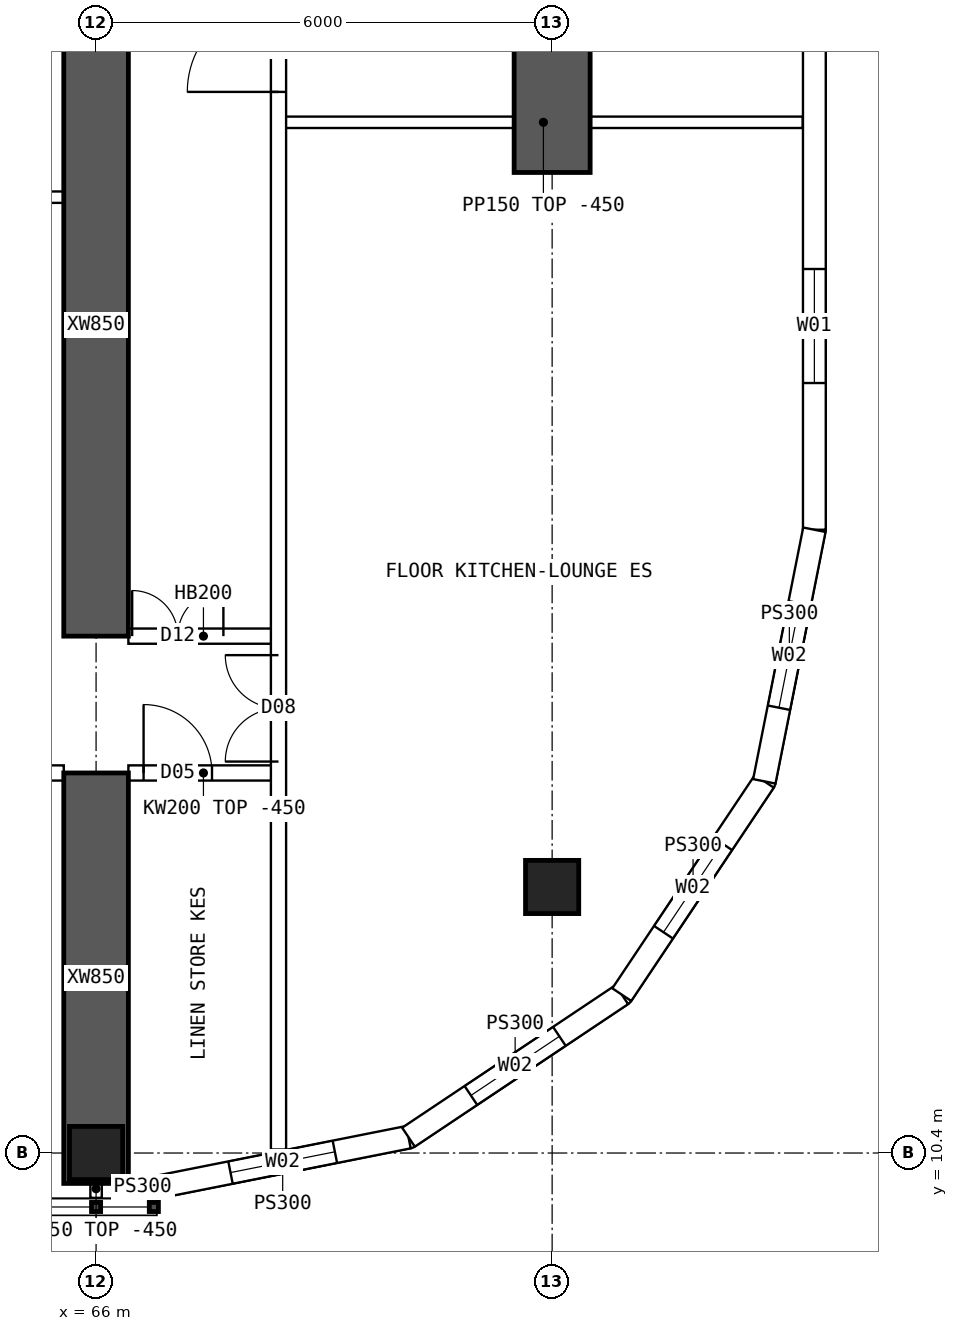
"""IFC4 building model, lengths in metres.
Left out: names, types, materials, properties, quantities, classifications, styles, units other than length and angle.
Written with IfcOpenShell. Run it as: python <this file> out.ifc"""

import sys

from ifc_helpers import new_model, si_unit, direction, frame, frame_2d, origin, origin_2d, place, context, subcontext, project, spatial, polyline, rectangle, hollow_rectangle, outline, extrude, element, fill, save


model = new_model("IFC4")
c1 = context("Model", 3, precision=1e-05, world=origin(), true_north=direction((0.0, 1.0)))
c2 = subcontext(c1, "Body", "Model", "MODEL_VIEW")
j1 = project(units=[si_unit("LENGTHUNIT", "METRE"), si_unit("PLANEANGLEUNIT", "RADIAN")], contexts=[c1])
p1 = place(None, origin())
s1 = spatial("IfcSite", under=j1, at=p1, CompositionType="ELEMENT")
p2 = place(p1, origin())
s2 = spatial("IfcBuilding", under=s1, at=p2, CompositionType="ELEMENT")
p3 = place(p2, frame((0.0, 0.0, 159.85)))
s3 = spatial("IfcBuildingStorey", under=s2, at=p3, CompositionType="ELEMENT", Elevation=159.85)
for number, where, z_axis, x_axis in (
    (1, (66.0, 10.4, 0.0), (0.0, 0.0, 1.0), (1.0, 0.0, 0.0)),
    (2, (72.0, 13.9, 0.0), (0.0, 0.0, 1.0), (1.0, 0.0, 0.0)),
):
    element("IfcColumn", number, at=place(p3, frame(where, z_axis=z_axis, x_axis=x_axis)), inside=s3, PredefinedType="COLUMN", context=c2, shape_type="SweptSolid", body=[
        extrude(hollow_rectangle(XDim=0.7, YDim=0.7, WallThickness=0.07, at=origin_2d()), origin(), (0.0, 0.0, 1.0), 3.75),
    ])
p4 = place(p3, frame((72.0, 23.3, 0.0), z_axis=(0.0, 0.0, 1.0), x_axis=(0.0, 1.0, 0.0)))
e3 = element("IfcWall", 3, at=p4, inside=s3, PredefinedType="SHEAR", context=c2, shape_type="SweptSolid", body=[
    extrude(rectangle(XDim=5.0, YDim=1.0, at=frame_2d((2.5, 0.0))), origin(), (0.0, 0.0, 1.0), 3.75),
])
p5 = place(p3, frame((66.0, 10.0, 0.0), z_axis=(0.0, 0.0, 1.0), x_axis=(0.0, 1.0, 0.0)))
e4 = element("IfcWall", 4, at=p5, inside=s3, PredefinedType="SHEAR", context=c2, shape_type="SweptSolid", body=[
    extrude(rectangle(XDim=5.4, YDim=0.85, at=frame_2d((2.7, 0.0))), origin(), (0.0, 0.0, 1.0), 3.75),
])
p6 = place(p3, frame((66.0, 17.2, 0.0), z_axis=(0.0, 0.0, 1.0), x_axis=(0.0, 1.0, 0.0)))
e5 = element("IfcWall", 5, at=p6, inside=s3, PredefinedType="SHEAR", context=c2, shape_type="SweptSolid", body=[
    extrude(rectangle(XDim=8.175, YDim=0.85, at=frame_2d((4.087, 0.0))), origin(), (0.0, 0.0, 1.0), 3.75),
])
p7 = place(p3, frame((75.45, 18.6, 0.0), z_axis=(0.0, 0.0, 1.0), x_axis=(0.0, 1.0, 0.0)))
e6 = element("IfcWall", 6, at=p7, inside=s3, PredefinedType="SOLIDWALL", context=c2, shape_type="SweptSolid", body=[
    extrude(outline(polyline([(-0.015, -0.15), (26.815, -0.15), (26.785, 0.15), (0.015, 0.15), (-0.015, -0.15)])), origin(), (0.0, 0.0, 1.0), 3.3),
])
p8 = place(p7, frame((1.93, 0.0, 0.9)))
e7 = element("IfcOpeningElement", 7, at=p8, cuts=e6, PredefinedType="OPENING", context=c2, shape_type="SweptSolid", body=[
    extrude(rectangle(XDim=1.5, YDim=2.0, at=frame_2d((0.75, 1.0))), frame((0.0, 0.16, 0.0), z_axis=(0.0, -1.0, 0.0), x_axis=(1.0, 0.0, 0.0)), (0.0, 0.0, 1.0), 0.32),
])
p9 = place(p7, frame((7.29, 0.0, 0.9)))
e8 = element("IfcOpeningElement", 8, at=p9, cuts=e6, PredefinedType="OPENING", context=c2, shape_type="SweptSolid", body=[
    extrude(rectangle(XDim=1.5, YDim=2.0, at=frame_2d((0.75, 1.0))), frame((0.0, 0.16, 0.0), z_axis=(0.0, -1.0, 0.0), x_axis=(1.0, 0.0, 0.0)), (0.0, 0.0, 1.0), 0.32),
])
p10 = place(p7, frame((12.65, 0.0, 0.9)))
e9 = element("IfcOpeningElement", 9, at=p10, cuts=e6, PredefinedType="OPENING", context=c2, shape_type="SweptSolid", body=[
    extrude(rectangle(XDim=1.5, YDim=2.0, at=frame_2d((0.75, 1.0))), frame((0.0, 0.16, 0.0), z_axis=(0.0, -1.0, 0.0), x_axis=(1.0, 0.0, 0.0)), (0.0, 0.0, 1.0), 0.32),
])
p11 = place(p7, frame((18.01, 0.0, 0.9)))
e10 = element("IfcOpeningElement", 10, at=p11, cuts=e6, PredefinedType="OPENING", context=c2, shape_type="SweptSolid", body=[
    extrude(rectangle(XDim=1.5, YDim=2.0, at=frame_2d((0.75, 1.0))), frame((0.0, 0.16, 0.0), z_axis=(0.0, -1.0, 0.0), x_axis=(1.0, 0.0, 0.0)), (0.0, 0.0, 1.0), 0.32),
])
p12 = place(p7, frame((23.37, 0.0, 0.9)))
e11 = element("IfcOpeningElement", 11, at=p12, cuts=e6, PredefinedType="OPENING", context=c2, shape_type="SweptSolid", body=[
    extrude(rectangle(XDim=1.5, YDim=2.0, at=frame_2d((0.75, 1.0))), frame((0.0, 0.16, 0.0), z_axis=(0.0, -1.0, 0.0), x_axis=(1.0, 0.0, 0.0)), (0.0, 0.0, 1.0), 0.32),
])
p13 = place(p3, frame((66.8, 9.95, 0.0), z_axis=(0.0, 0.0, 1.0), x_axis=(0.98078325777, 0.195100490205, 0.0)))
e12 = element("IfcWall", 12, at=p13, inside=s3, PredefinedType="SOLIDWALL", context=c2, shape_type="SweptSolid", body=[
    extrude(outline(polyline([(-0.03, -0.15), (3.405, -0.15), (3.345, 0.15), (0.03, 0.15), (-0.03, -0.15)])), origin(), (0.0, 0.0, 1.0), 3.3),
])
p14 = place(p13, frame((0.988, 0.0, 0.9)))
e13 = element("IfcOpeningElement", 13, at=p14, cuts=e12, PredefinedType="OPENING", context=c2, shape_type="SweptSolid", body=[
    extrude(rectangle(XDim=1.4, YDim=1.8, at=frame_2d((0.7, 0.9))), frame((0.0, 0.16, 0.0), z_axis=(0.0, -1.0, 0.0), x_axis=(1.0, 0.0, 0.0)), (0.0, 0.0, 1.0), 0.32),
])
p15 = place(p3, frame((70.11, 10.608, 0.0), z_axis=(0.0, 0.0, 1.0), x_axis=(0.831493450887, 0.555534554399, 0.0)))
e14 = element("IfcWall", 14, at=p15, inside=s3, PredefinedType="SOLIDWALL", context=c2, shape_type="SweptSolid", body=[
    extrude(outline(polyline([(-0.03, -0.15), (3.405, -0.15), (3.345, 0.15), (0.03, 0.15), (-0.03, -0.15)])), origin(), (0.0, 0.0, 1.0), 3.3),
])
p16 = place(p15, frame((0.988, 0.0, 0.9)))
e15 = element("IfcOpeningElement", 15, at=p16, cuts=e14, PredefinedType="OPENING", context=c2, shape_type="SweptSolid", body=[
    extrude(rectangle(XDim=1.4, YDim=1.8, at=frame_2d((0.7, 0.9))), frame((0.0, 0.16, 0.0), z_axis=(0.0, -1.0, 0.0), x_axis=(1.0, 0.0, 0.0)), (0.0, 0.0, 1.0), 0.32),
])
p17 = place(p3, frame((72.917, 12.483, 0.0), z_axis=(0.0, 0.0, 1.0), x_axis=(0.555534554399, 0.831493450887, 0.0)))
e16 = element("IfcWall", 16, at=p17, inside=s3, PredefinedType="SOLIDWALL", context=c2, shape_type="SweptSolid", body=[
    extrude(outline(polyline([(-0.03, -0.15), (3.405, -0.15), (3.345, 0.15), (0.03, 0.15), (-0.03, -0.15)])), origin(), (0.0, 0.0, 1.0), 3.3),
])
p18 = place(p17, frame((0.988, 0.0, 0.9)))
e17 = element("IfcOpeningElement", 17, at=p18, cuts=e16, PredefinedType="OPENING", context=c2, shape_type="SweptSolid", body=[
    extrude(rectangle(XDim=1.4, YDim=1.8, at=frame_2d((0.7, 0.9))), frame((0.0, 0.16, 0.0), z_axis=(0.0, -1.0, 0.0), x_axis=(1.0, 0.0, 0.0)), (0.0, 0.0, 1.0), 0.32),
])
p19 = place(p3, frame((74.792, 15.29, 0.0), z_axis=(0.0, 0.0, 1.0), x_axis=(0.19508664885, 0.980786011034, 0.0)))
e18 = element("IfcWall", 18, at=p19, inside=s3, PredefinedType="SOLIDWALL", context=c2, shape_type="SweptSolid", body=[
    extrude(outline(polyline([(-0.03, -0.15), (3.39, -0.15), (3.36, 0.15), (0.03, 0.15), (-0.03, -0.15)])), origin(), (0.0, 0.0, 1.0), 3.3),
])
p20 = place(p19, frame((0.988, 0.0, 0.9)))
e19 = element("IfcOpeningElement", 19, at=p20, cuts=e18, PredefinedType="OPENING", context=c2, shape_type="SweptSolid", body=[
    extrude(rectangle(XDim=1.4, YDim=1.8, at=frame_2d((0.7, 0.9))), frame((0.0, 0.16, 0.0), z_axis=(0.0, -1.0, 0.0), x_axis=(1.0, 0.0, 0.0)), (0.0, 0.0, 1.0), 0.32),
])
p21 = place(p3, frame((66.8, 9.95, 0.0), z_axis=(0.0, 0.0, 1.0), x_axis=(-1.0, 0.0, 0.0)))
e20 = element("IfcWall", 20, at=p21, inside=s3, PredefinedType="SOLIDWALL", context=c2, shape_type="SweptSolid", body=[
    extrude(rectangle(XDim=0.375, YDim=0.3, at=frame_2d((0.188, 0.0))), origin(), (0.0, 0.0, 1.0), 3.3),
])
p22 = place(p3, frame((60.425, 15.4, 0.0), z_axis=(0.0, 0.0, 1.0), x_axis=(1.0, 0.0, 0.0)))
e21 = element("IfcWall", 21, at=p22, inside=s3, PredefinedType="SOLIDWALL", context=c2, shape_type="SweptSolid", body=[
    extrude(outline(polyline([(0.0, 0.0), (5.15, 0.0), (5.15, 2.9), (0.0, 2.9), (0.0, 0.0)])), frame((0.0, 0.1, 0.0), z_axis=(0.0, -1.0, 0.0), x_axis=(1.0, 0.0, 0.0)), (0.0, 0.0, 1.0), 0.2),
])
p23 = place(p22, frame((0.6, 0.0, 0.0)))
e22 = element("IfcOpeningElement", 22, at=p23, cuts=e21, PredefinedType="OPENING", context=c2, shape_type="SweptSolid", body=[
    extrude(rectangle(XDim=1.0, YDim=2.1, at=frame_2d((0.5, 1.05))), frame((0.0, 0.11, 0.0), z_axis=(0.0, -1.0, 0.0), x_axis=(1.0, 0.0, 0.0)), (0.0, 0.0, 1.0), 0.22),
])
p24 = place(p3, frame((66.425, 15.4, 0.0), z_axis=(0.0, 0.0, 1.0), x_axis=(1.0, 0.0, 0.0)))
e23 = element("IfcWall", 23, at=p24, inside=s3, PredefinedType="SOLIDWALL", context=c2, shape_type="SweptSolid", body=[
    extrude(rectangle(XDim=1.975, YDim=0.2, at=frame_2d((0.987, 0.0))), origin(), (0.0, 0.0, 1.0), 3.3),
])
p25 = place(p24, frame((0.2, 0.0, 0.0)))
e24 = element("IfcOpeningElement", 24, at=p25, cuts=e23, PredefinedType="OPENING", context=c2, shape_type="SweptSolid", body=[
    extrude(rectangle(XDim=0.9, YDim=2.1, at=frame_2d((0.45, 1.05))), frame((0.0, 0.11, 0.0), z_axis=(0.0, -1.0, 0.0), x_axis=(1.0, 0.0, 0.0)), (0.0, 0.0, 1.0), 0.22),
])
p26 = place(p3, frame((66.425, 17.2, 0.0), z_axis=(0.0, 0.0, 1.0), x_axis=(1.0, 0.0, 0.0)))
e25 = element("IfcWall", 25, at=p26, inside=s3, PredefinedType="SOLIDWALL", context=c2, shape_type="SweptSolid", body=[
    extrude(rectangle(XDim=1.975, YDim=0.2, at=frame_2d((0.987, 0.0))), origin(), (0.0, 0.0, 1.0), 3.3),
])
p27 = place(p26, frame((0.05, 0.0, 0.0)))
e26 = element("IfcOpeningElement", 26, at=p27, cuts=e25, PredefinedType="OPENING", context=c2, shape_type="SweptSolid", body=[
    extrude(rectangle(XDim=1.2, YDim=2.1, at=frame_2d((0.6, 1.05))), frame((0.0, 0.11, 0.0), z_axis=(0.0, -1.0, 0.0), x_axis=(1.0, 0.0, 0.0)), (0.0, 0.0, 1.0), 0.22),
])
p28 = place(p3, frame((60.075, 22.975, 0.0), z_axis=(0.0, 0.0, 1.0), x_axis=(1.0, 0.0, 0.0)))
e27 = element("IfcWall", 27, at=p28, inside=s3, PredefinedType="PARTITIONING", context=c2, shape_type="SweptSolid", body=[
    extrude(rectangle(XDim=5.5, YDim=0.15, at=frame_2d((2.75, 0.0))), origin(), (0.0, 0.0, 1.0), 3.3),
])
p29 = place(p28, frame((0.4, 0.0, 0.0)))
e28 = element("IfcOpeningElement", 28, at=p29, cuts=e27, PredefinedType="OPENING", context=c2, shape_type="SweptSolid", body=[
    extrude(rectangle(XDim=1.0, YDim=2.1, at=frame_2d((0.5, 1.05))), frame((0.0, 0.085, 0.0), z_axis=(0.0, -1.0, 0.0), x_axis=(1.0, 0.0, 0.0)), (0.0, 0.0, 1.0), 0.17),
])
p30 = place(p3, frame((68.4, 10.446, 0.0), z_axis=(0.0, 0.0, 1.0), x_axis=(0.0, 1.0, 0.0)))
e29 = element("IfcWall", 29, at=p30, inside=s3, PredefinedType="SOLIDWALL", context=c2, shape_type="SweptSolid", body=[
    extrude(rectangle(XDim=43.107, YDim=0.2, at=frame_2d((21.554, 0.0))), origin(), (0.0, 0.0, 1.0), 3.3),
])
p31 = place(p30, frame((13.914, 0.0, 0.0)))
e30 = element("IfcOpeningElement", 30, at=p31, cuts=e29, PredefinedType="OPENING", context=c2, shape_type="SweptSolid", body=[
    extrude(rectangle(XDim=1.2, YDim=2.1, at=frame_2d((0.6, 1.05))), frame((0.0, 0.11, 0.0), z_axis=(0.0, -1.0, 0.0), x_axis=(1.0, 0.0, 0.0)), (0.0, 0.0, 1.0), 0.22),
])
p32 = place(p30, frame((22.634, 0.0, 0.0)))
e31 = element("IfcOpeningElement", 31, at=p32, cuts=e29, PredefinedType="OPENING", context=c2, shape_type="SweptSolid", body=[
    extrude(rectangle(XDim=1.2, YDim=2.1, at=frame_2d((0.6, 1.05))), frame((0.0, 0.11, 0.0), z_axis=(0.0, -1.0, 0.0), x_axis=(1.0, 0.0, 0.0)), (0.0, 0.0, 1.0), 0.22),
])
p33 = place(p30, frame((5.104, 0.0, 0.0)))
e32 = element("IfcOpeningElement", 32, at=p33, cuts=e29, PredefinedType="OPENING", context=c2, shape_type="SweptSolid", body=[
    extrude(rectangle(XDim=1.4, YDim=2.1, at=frame_2d((0.7, 1.05))), frame((0.0, 0.11, 0.0), z_axis=(0.0, -1.0, 0.0), x_axis=(1.0, 0.0, 0.0)), (0.0, 0.0, 1.0), 0.22),
])
p34 = place(p30, frame((36.504, 0.0, 0.0)))
e33 = element("IfcOpeningElement", 33, at=p34, cuts=e29, PredefinedType="OPENING", context=c2, shape_type="SweptSolid", body=[
    extrude(rectangle(XDim=1.4, YDim=2.1, at=frame_2d((0.7, 1.05))), frame((0.0, 0.11, 0.0), z_axis=(0.0, -1.0, 0.0), x_axis=(1.0, 0.0, 0.0)), (0.0, 0.0, 1.0), 0.22),
])
p35 = place(p3, frame((68.475, 23.96, 0.0), z_axis=(0.0, 0.0, 1.0), x_axis=(1.0, 0.0, 0.0)))
e34 = element("IfcWall", 34, at=p35, inside=s3, PredefinedType="PARTITIONING", context=c2, shape_type="SweptSolid", body=[
    extrude(rectangle(XDim=6.82, YDim=0.15, at=frame_2d((3.41, 0.0))), origin(), (0.0, 0.0, 1.0), 3.3),
])
p36 = place(p3, frame((66.0, 10.05, 0.0), z_axis=(0.0, 0.0, 1.0), x_axis=(0.0, -1.0, 0.0)))
e35 = element("IfcWall", 35, at=p36, inside=s3, PredefinedType="PARTITIONING", context=c2, shape_type="SweptSolid", body=[
    extrude(rectangle(XDim=0.24, YDim=0.15, at=frame_2d((0.12, 0.0))), origin(), (0.0, 0.0, 1.0), 3.3),
])
p37 = place(p8, origin())
e36 = element("IfcWindow", 36, at=p37, inside=s3, PartitioningType="SINGLE_PANEL", PredefinedType="WINDOW", context=c2, shape_type="SweptSolid", body=[
    extrude(rectangle(XDim=1.5, YDim=2.0, at=frame_2d((0.75, 1.0))), frame((0.0, 0.03, 0.0), z_axis=(0.0, -1.0, 0.0), x_axis=(1.0, 0.0, 0.0)), (0.0, 0.0, 1.0), 0.06),
])
fill(e7, e36)
p38 = place(p14, origin())
e37 = element("IfcWindow", 37, at=p38, inside=s3, PartitioningType="SINGLE_PANEL", PredefinedType="WINDOW", context=c2, shape_type="SweptSolid", body=[
    extrude(rectangle(XDim=1.4, YDim=1.8, at=frame_2d((0.7, 0.9))), frame((0.0, 0.03, 0.0), z_axis=(0.0, -1.0, 0.0), x_axis=(1.0, 0.0, 0.0)), (0.0, 0.0, 1.0), 0.06),
])
fill(e13, e37)
p39 = place(p16, origin())
e38 = element("IfcWindow", 38, at=p39, inside=s3, PartitioningType="SINGLE_PANEL", PredefinedType="WINDOW", context=c2, shape_type="SweptSolid", body=[
    extrude(rectangle(XDim=1.4, YDim=1.8, at=frame_2d((0.7, 0.9))), frame((0.0, 0.03, 0.0), z_axis=(0.0, -1.0, 0.0), x_axis=(1.0, 0.0, 0.0)), (0.0, 0.0, 1.0), 0.06),
])
fill(e15, e38)
p40 = place(p18, origin())
e39 = element("IfcWindow", 39, at=p40, inside=s3, PartitioningType="SINGLE_PANEL", PredefinedType="WINDOW", context=c2, shape_type="SweptSolid", body=[
    extrude(rectangle(XDim=1.4, YDim=1.8, at=frame_2d((0.7, 0.9))), frame((0.0, 0.03, 0.0), z_axis=(0.0, -1.0, 0.0), x_axis=(1.0, 0.0, 0.0)), (0.0, 0.0, 1.0), 0.06),
])
fill(e17, e39)
p41 = place(p20, origin())
e40 = element("IfcWindow", 40, at=p41, inside=s3, PartitioningType="SINGLE_PANEL", PredefinedType="WINDOW", context=c2, shape_type="SweptSolid", body=[
    extrude(rectangle(XDim=1.4, YDim=1.8, at=frame_2d((0.7, 0.9))), frame((0.0, 0.03, 0.0), z_axis=(0.0, -1.0, 0.0), x_axis=(1.0, 0.0, 0.0)), (0.0, 0.0, 1.0), 0.06),
])
fill(e19, e40)
p42 = place(p27, origin())
e41 = element("IfcDoor", 41, at=p42, inside=s3, OperationType="DOUBLE_DOOR_SINGLE_SWING", PredefinedType="DOOR", context=c2, shape_type="SweptSolid", body=[
    extrude(rectangle(XDim=1.2, YDim=2.1, at=frame_2d((0.6, 1.05))), frame((0.0, 0.025, 0.0), z_axis=(0.0, -1.0, 0.0), x_axis=(1.0, 0.0, 0.0)), (0.0, 0.0, 1.0), 0.05),
])
fill(e26, e41)
p43 = place(p31, origin())
e42 = element("IfcDoor", 42, at=p43, inside=s3, OperationType="SINGLE_SWING_LEFT", PredefinedType="DOOR", context=c2, shape_type="SweptSolid", body=[
    extrude(rectangle(XDim=1.2, YDim=2.1, at=frame_2d((0.6, 1.05))), frame((0.0, 0.025, 0.0), z_axis=(0.0, -1.0, 0.0), x_axis=(1.0, 0.0, 0.0)), (0.0, 0.0, 1.0), 0.05),
])
fill(e30, e42)
p44 = place(p33, origin())
e43 = element("IfcDoor", 43, at=p44, inside=s3, OperationType="DOUBLE_DOOR_SINGLE_SWING", PredefinedType="DOOR", context=c2, shape_type="SweptSolid", body=[
    extrude(rectangle(XDim=1.4, YDim=2.1, at=frame_2d((0.7, 1.05))), frame((0.0, 0.025, 0.0), z_axis=(0.0, -1.0, 0.0), x_axis=(1.0, 0.0, 0.0)), (0.0, 0.0, 1.0), 0.05),
])
fill(e32, e43)
p45 = place(p25, origin())
e44 = element("IfcDoor", 44, at=p45, inside=s3, OperationType="SINGLE_SWING_LEFT", PredefinedType="DOOR", context=c2, shape_type="SweptSolid", body=[
    extrude(rectangle(XDim=0.9, YDim=2.1, at=frame_2d((0.45, 1.05))), frame((0.0, 0.025, 0.0), z_axis=(0.0, -1.0, 0.0), x_axis=(1.0, 0.0, 0.0)), (0.0, 0.0, 1.0), 0.05),
])
fill(e24, e44)
save(model, sys.argv[1])
